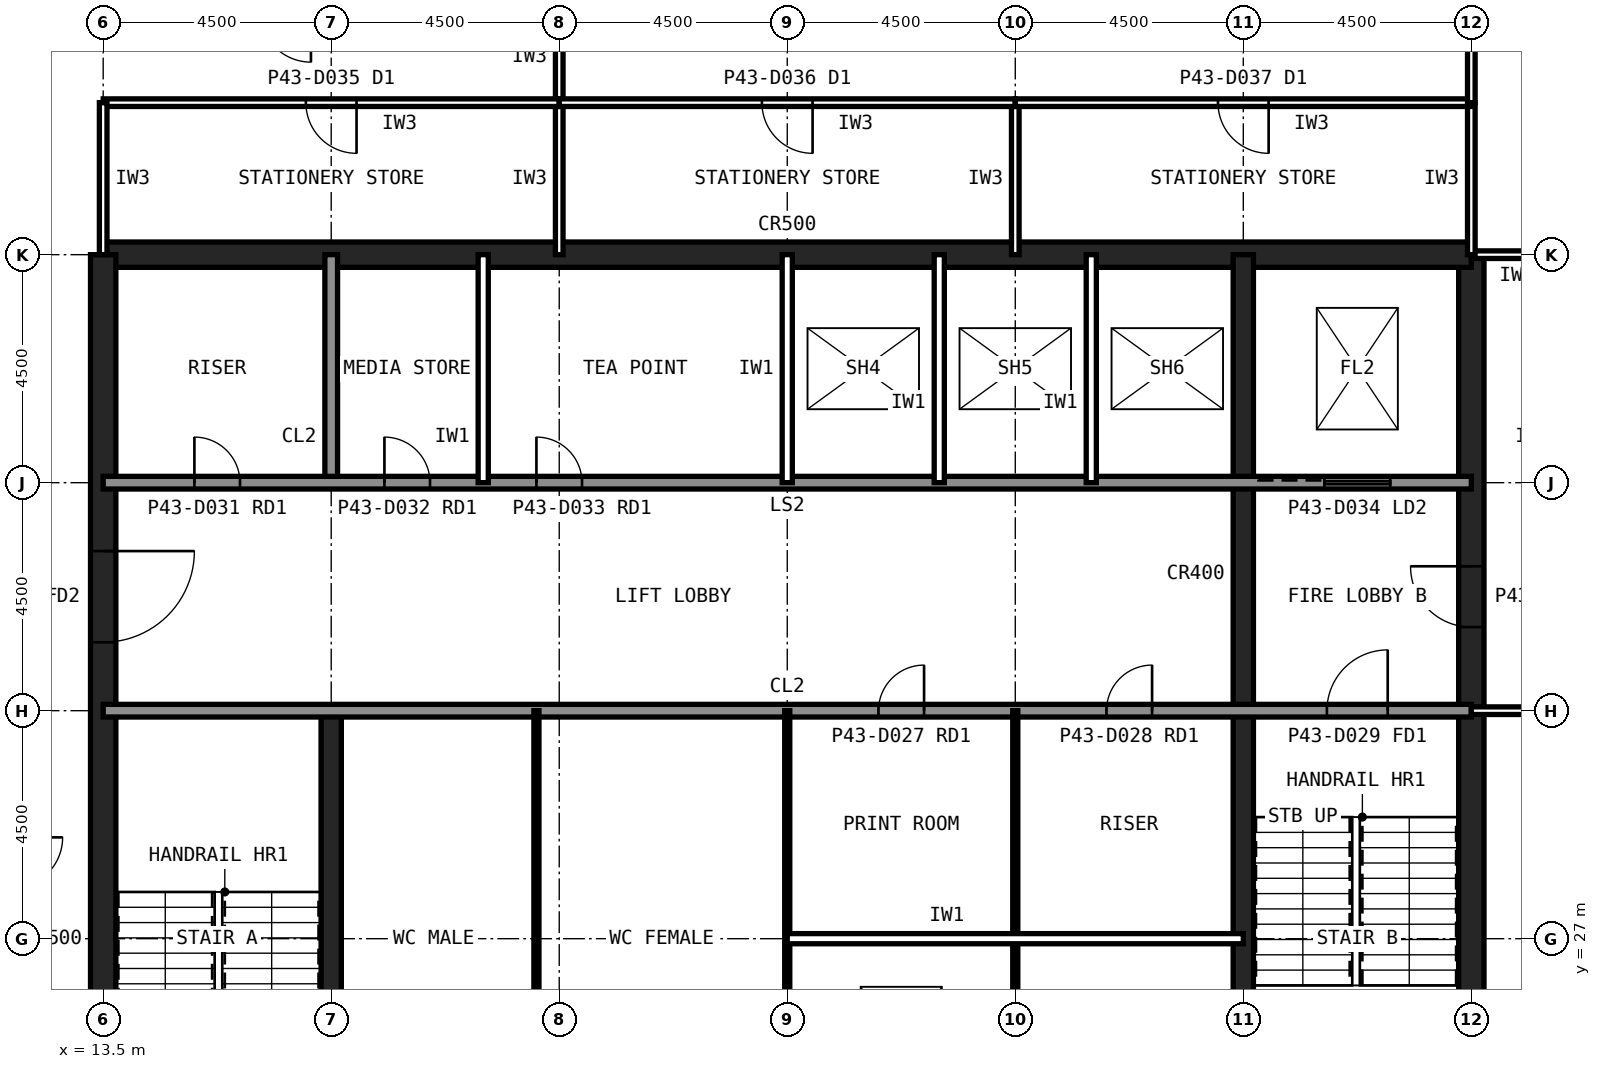
"""IFC4 building model, lengths in metres.
Left out: names, types, materials, properties, quantities, classifications, styles, units other than length and angle.
Written with IfcOpenShell. Run it as: python <this file> out.ifc"""

import sys

from ifc_helpers import new_model, si_unit, direction, frame, frame_2d, origin, place, context, subcontext, project, spatial, rectangle, extrude, element, fill, save


model = new_model("IFC4")
c1 = context("Model", 3, precision=1e-05, world=origin(), true_north=direction((0.0, 1.0)))
c2 = subcontext(c1, "Body", "Model", "MODEL_VIEW")
j1 = project(units=[si_unit("LENGTHUNIT", "METRE"), si_unit("PLANEANGLEUNIT", "RADIAN")], contexts=[c1])
p1 = place(None, origin())
s1 = spatial("IfcSite", under=j1, at=p1, CompositionType="ELEMENT")
p2 = place(p1, origin())
s2 = spatial("IfcBuilding", under=s1, at=p2, CompositionType="ELEMENT")
p3 = place(p2, frame((0.0, 0.0, 183.6)))
s3 = spatial("IfcBuildingStorey", under=s2, at=p3, CompositionType="ELEMENT", Elevation=183.6)
p4 = place(p3, frame((40.5, 13.5, 0.0), z_axis=(0.0, 0.0, 1.0), x_axis=(0.0, 1.0, 0.0)))
e1 = element("IfcWall", 1, at=p4, inside=s3, PredefinedType="SHEAR", context=c2, shape_type="SweptSolid", body=[
    extrude(rectangle(XDim=27.0, YDim=0.5, at=frame_2d((13.5, 0.0))), origin(), (0.0, 0.0, 1.0), 4.0),
])
p5 = place(p4, frame((5.85, 0.0, 0.0)))
e2 = element("IfcOpeningElement", 2, at=p5, cuts=e1, PredefinedType="OPENING", context=c2, shape_type="SweptSolid", body=[
    extrude(rectangle(XDim=1.8, YDim=2.1, at=frame_2d((0.9, 1.05))), frame((0.0, 0.26, 0.0), z_axis=(0.0, -1.0, 0.0), x_axis=(1.0, 0.0, 0.0)), (0.0, 0.0, 1.0), 0.52),
])
p6 = place(p4, frame((19.65, 0.0, 0.0)))
e3 = element("IfcOpeningElement", 3, at=p6, cuts=e1, PredefinedType="OPENING", context=c2, shape_type="SweptSolid", body=[
    extrude(rectangle(XDim=1.2, YDim=2.1, at=frame_2d((0.6, 1.05))), frame((0.0, 0.26, 0.0), z_axis=(0.0, -1.0, 0.0), x_axis=(1.0, 0.0, 0.0)), (0.0, 0.0, 1.0), 0.52),
])
p7 = place(p3, frame((40.5, 40.5, 0.0), z_axis=(0.0, 0.0, 1.0), x_axis=(-1.0, 0.0, 0.0)))
e4 = element("IfcWall", 4, at=p7, inside=s3, PredefinedType="SHEAR", context=c2, shape_type="SweptSolid", body=[
    extrude(rectangle(XDim=27.0, YDim=0.5, at=frame_2d((13.5, 0.0))), origin(), (0.0, 0.0, 1.0), 4.0),
])
p8 = place(p3, frame((13.5, 40.5, 0.0), z_axis=(0.0, 0.0, 1.0), x_axis=(0.0, -1.0, 0.0)))
e5 = element("IfcWall", 5, at=p8, inside=s3, PredefinedType="SHEAR", context=c2, shape_type="SweptSolid", body=[
    extrude(rectangle(XDim=27.0, YDim=0.5, at=frame_2d((13.5, 0.0))), origin(), (0.0, 0.0, 1.0), 4.0),
])
p9 = place(p8, frame((19.65, 0.0, 0.0)))
e6 = element("IfcOpeningElement", 6, at=p9, cuts=e5, PredefinedType="OPENING", context=c2, shape_type="SweptSolid", body=[
    extrude(rectangle(XDim=1.2, YDim=2.1, at=frame_2d((0.6, 1.05))), frame((0.0, 0.26, 0.0), z_axis=(0.0, -1.0, 0.0), x_axis=(1.0, 0.0, 0.0)), (0.0, 0.0, 1.0), 0.52),
])
p10 = place(p8, frame((5.85, 0.0, 0.0)))
e7 = element("IfcOpeningElement", 7, at=p10, cuts=e5, PredefinedType="OPENING", context=c2, shape_type="SweptSolid", body=[
    extrude(rectangle(XDim=1.8, YDim=2.1, at=frame_2d((0.9, 1.05))), frame((0.0, 0.26, 0.0), z_axis=(0.0, -1.0, 0.0), x_axis=(1.0, 0.0, 0.0)), (0.0, 0.0, 1.0), 0.52),
])
p11 = place(p3, frame((18.0, 13.5, 0.0), z_axis=(0.0, 0.0, 1.0), x_axis=(0.0, 1.0, 0.0)))
e8 = element("IfcWall", 8, at=p11, inside=s3, PredefinedType="SHEAR", context=c2, shape_type="SweptSolid", body=[
    extrude(rectangle(XDim=18.0, YDim=0.4, at=frame_2d((9.0, 0.0))), origin(), (0.0, 0.0, 1.0), 4.0),
])
p12 = place(p3, frame((18.0, 36.0, 0.0), z_axis=(0.0, 0.0, 1.0), x_axis=(0.0, 1.0, 0.0)))
e9 = element("IfcWall", 9, at=p12, inside=s3, PredefinedType="SOLIDWALL", context=c2, shape_type="SweptSolid", body=[
    extrude(rectangle(XDim=4.5, YDim=0.25, at=frame_2d((2.25, 0.0))), origin(), (0.0, 0.0, 1.0), 3.84),
])
p13 = place(p3, frame((36.0, 22.5, 0.0), z_axis=(0.0, 0.0, 1.0), x_axis=(0.0, 1.0, 0.0)))
e10 = element("IfcWall", 10, at=p13, inside=s3, PredefinedType="SHEAR", context=c2, shape_type="SweptSolid", body=[
    extrude(rectangle(XDim=18.0, YDim=0.4, at=frame_2d((9.0, 0.0))), origin(), (0.0, 0.0, 1.0), 4.0),
])
p14 = place(p3, frame((13.5, 36.0, 0.0), z_axis=(0.0, 0.0, 1.0), x_axis=(1.0, 0.0, 0.0)))
e11 = element("IfcWall", 11, at=p14, inside=s3, PredefinedType="SOLIDWALL", context=c2, shape_type="SweptSolid", body=[
    extrude(rectangle(XDim=27.0, YDim=0.25, at=frame_2d((13.5, 0.0))), origin(), (0.0, 0.0, 1.0), 3.84),
])
p15 = place(p14, frame((1.8, 0.0, 0.0)))
e12 = element("IfcOpeningElement", 12, at=p15, cuts=e11, PredefinedType="OPENING", context=c2, shape_type="SweptSolid", body=[
    extrude(rectangle(XDim=0.9, YDim=2.1, at=frame_2d((0.45, 1.05))), frame((0.0, 0.135, 0.0), z_axis=(0.0, -1.0, 0.0), x_axis=(1.0, 0.0, 0.0)), (0.0, 0.0, 1.0), 0.27),
])
p16 = place(p14, frame((5.55, 0.0, 0.0)))
e13 = element("IfcOpeningElement", 13, at=p16, cuts=e11, PredefinedType="OPENING", context=c2, shape_type="SweptSolid", body=[
    extrude(rectangle(XDim=0.9, YDim=2.1, at=frame_2d((0.45, 1.05))), frame((0.0, 0.135, 0.0), z_axis=(0.0, -1.0, 0.0), x_axis=(1.0, 0.0, 0.0)), (0.0, 0.0, 1.0), 0.27),
])
p17 = place(p14, frame((8.55, 0.0, 0.0)))
e14 = element("IfcOpeningElement", 14, at=p17, cuts=e11, PredefinedType="OPENING", context=c2, shape_type="SweptSolid", body=[
    extrude(rectangle(XDim=0.9, YDim=2.1, at=frame_2d((0.45, 1.05))), frame((0.0, 0.135, 0.0), z_axis=(0.0, -1.0, 0.0), x_axis=(1.0, 0.0, 0.0)), (0.0, 0.0, 1.0), 0.27),
])
p18 = place(p14, frame((24.1, 0.0, 0.0)))
e15 = element("IfcOpeningElement", 15, at=p18, cuts=e11, PredefinedType="OPENING", context=c2, shape_type="SweptSolid", body=[
    extrude(rectangle(XDim=1.3, YDim=2.2, at=frame_2d((0.65, 1.1))), frame((0.0, 0.135, 0.0), z_axis=(0.0, -1.0, 0.0), x_axis=(1.0, 0.0, 0.0)), (0.0, 0.0, 1.0), 0.27),
])
p19 = place(p3, frame((13.5, 31.5, 0.0), z_axis=(0.0, 0.0, 1.0), x_axis=(1.0, 0.0, 0.0)))
e16 = element("IfcWall", 16, at=p19, inside=s3, PredefinedType="SOLIDWALL", context=c2, shape_type="SweptSolid", body=[
    extrude(rectangle(XDim=27.0, YDim=0.25, at=frame_2d((13.5, 0.0))), origin(), (0.0, 0.0, 1.0), 3.84),
])
p20 = place(p19, frame((24.15, 0.0, 0.0)))
e17 = element("IfcOpeningElement", 17, at=p20, cuts=e16, PredefinedType="OPENING", context=c2, shape_type="SweptSolid", body=[
    extrude(rectangle(XDim=1.2, YDim=2.1, at=frame_2d((0.6, 1.05))), frame((0.0, 0.135, 0.0), z_axis=(0.0, -1.0, 0.0), x_axis=(1.0, 0.0, 0.0)), (0.0, 0.0, 1.0), 0.27),
])
p21 = place(p19, frame((15.3, 0.0, 0.0)))
e18 = element("IfcOpeningElement", 18, at=p21, cuts=e16, PredefinedType="OPENING", context=c2, shape_type="SweptSolid", body=[
    extrude(rectangle(XDim=0.9, YDim=2.1, at=frame_2d((0.45, 1.05))), frame((0.0, 0.135, 0.0), z_axis=(0.0, -1.0, 0.0), x_axis=(1.0, 0.0, 0.0)), (0.0, 0.0, 1.0), 0.27),
])
p22 = place(p19, frame((19.8, 0.0, 0.0)))
e19 = element("IfcOpeningElement", 19, at=p22, cuts=e16, PredefinedType="OPENING", context=c2, shape_type="SweptSolid", body=[
    extrude(rectangle(XDim=0.9, YDim=2.1, at=frame_2d((0.45, 1.05))), frame((0.0, 0.135, 0.0), z_axis=(0.0, -1.0, 0.0), x_axis=(1.0, 0.0, 0.0)), (0.0, 0.0, 1.0), 0.27),
])
for number, where, z_axis, x_axis in (
    (20, (21.0, 36.0, 0.0), (0.0, 0.0, 1.0), (0.0, 1.0, 0.0)),
    (21, (27.0, 36.0, 0.0), (0.0, 0.0, 1.0), (0.0, 1.0, 0.0)),
    (22, (30.0, 36.0, 0.0), (0.0, 0.0, 1.0), (0.0, 1.0, 0.0)),
    (23, (33.0, 36.0, 0.0), (0.0, 0.0, 1.0), (0.0, 1.0, 0.0)),
):
    element("IfcWall", number, at=place(p3, frame(where, z_axis=z_axis, x_axis=x_axis)), inside=s3, PredefinedType="PARTITIONING", context=c2, shape_type="SweptSolid", body=[
        extrude(rectangle(XDim=4.5, YDim=0.2, at=frame_2d((2.25, 0.0))), origin(), (0.0, 0.0, 1.0), 3.84),
    ])
for number, where, z_axis, x_axis in (
    (24, (22.05, 22.5, 0.0), (0.0, 0.0, 1.0), (0.0, 1.0, 0.0)),
    (25, (27.0, 22.5, 0.0), (0.0, 0.0, 1.0), (0.0, 1.0, 0.0)),
    (26, (31.5, 22.5, 0.0), (0.0, 0.0, 1.0), (0.0, 1.0, 0.0)),
):
    element("IfcWall", number, at=place(p3, frame(where, z_axis=z_axis, x_axis=x_axis)), inside=s3, PredefinedType="PLUMBINGWALL", context=c2, shape_type="SweptSolid", body=[
        extrude(rectangle(XDim=9.0, YDim=0.1, at=frame_2d((4.5, 0.0))), origin(), (0.0, 0.0, 1.0), 3.84),
    ])
p23 = place(p3, frame((27.0, 27.0, 0.0), z_axis=(0.0, 0.0, 1.0), x_axis=(1.0, 0.0, 0.0)))
e27 = element("IfcWall", 27, at=p23, inside=s3, PredefinedType="PARTITIONING", context=c2, shape_type="SweptSolid", body=[
    extrude(rectangle(XDim=9.0, YDim=0.2, at=frame_2d((4.5, 0.0))), origin(), (0.0, 0.0, 1.0), 3.84),
])
for number, where, z_axis, x_axis in (
    (28, (22.5, 43.5, 0.0), (0.0, 0.0, 1.0), (0.0, 1.0, 0.0)),
    (29, (42.3, 40.5, 0.0), (0.0, 0.0, 1.0), (-1.0, 0.0, 0.0)),
):
    element("IfcWall", number, at=place(p3, frame(where, z_axis=z_axis, x_axis=x_axis)), inside=s3, PredefinedType="PARTITIONING", context=c2, shape_type="SweptSolid", body=[
        extrude(rectangle(XDim=1.8, YDim=0.15, at=frame_2d((0.9, 0.0))), origin(), (0.0, 0.0, 1.0), 2.989),
    ])
p24 = place(p3, frame((47.25, 31.5, 0.0), z_axis=(0.0, 0.0, 1.0), x_axis=(-1.0, 0.0, 0.0)))
e30 = element("IfcWall", 30, at=p24, inside=s3, PredefinedType="PARTITIONING", context=c2, shape_type="SweptSolid", body=[
    extrude(rectangle(XDim=6.75, YDim=0.15, at=frame_2d((3.375, 0.0))), origin(), (0.0, 0.0, 1.0), 2.989),
])
p25 = place(p24, frame((2.875, 0.0, 0.0)))
e31 = element("IfcOpeningElement", 31, at=p25, cuts=e30, PredefinedType="OPENING", context=c2, shape_type="SweptSolid", body=[
    extrude(rectangle(XDim=1.0, YDim=2.1, at=frame_2d((0.5, 1.05))), frame((0.0, 0.085, 0.0), z_axis=(0.0, -1.0, 0.0), x_axis=(1.0, 0.0, 0.0)), (0.0, 0.0, 1.0), 0.17),
])
p26 = place(p3, frame((22.5, 40.5, 0.0), z_axis=(0.0, 0.0, 1.0), x_axis=(0.0, 1.0, 0.0)))
e32 = element("IfcWall", 32, at=p26, inside=s3, PredefinedType="PARTITIONING", context=c2, shape_type="SweptSolid", body=[
    extrude(rectangle(XDim=3.0, YDim=0.15, at=frame_2d((1.5, 0.0))), origin(), (0.0, 0.0, 1.0), 2.989),
])
p27 = place(p3, frame((22.5, 43.5, 0.0), z_axis=(0.0, 0.0, 1.0), x_axis=(-1.0, 0.0, 0.0)))
e33 = element("IfcWall", 33, at=p27, inside=s3, PredefinedType="PARTITIONING", context=c2, shape_type="SweptSolid", body=[
    extrude(rectangle(XDim=9.0, YDim=0.15, at=frame_2d((4.5, 0.0))), origin(), (0.0, 0.0, 1.0), 3.84),
])
p28 = place(p27, frame((4.0, 0.0, 0.0)))
e34 = element("IfcOpeningElement", 34, at=p28, cuts=e33, PredefinedType="OPENING", context=c2, shape_type="SweptSolid", body=[
    extrude(rectangle(XDim=1.0, YDim=2.1, at=frame_2d((0.5, 1.05))), frame((0.0, 0.085, 0.0), z_axis=(0.0, -1.0, 0.0), x_axis=(1.0, 0.0, 0.0)), (0.0, 0.0, 1.0), 0.17),
])
for number, where, z_axis, x_axis in (
    (35, (13.5, 43.5, 0.0), (0.0, 0.0, 1.0), (0.0, -1.0, 0.0)),
    (36, (31.5, 40.5, 0.0), (0.0, 0.0, 1.0), (0.0, 1.0, 0.0)),
):
    element("IfcWall", number, at=place(p3, frame(where, z_axis=z_axis, x_axis=x_axis)), inside=s3, PredefinedType="PARTITIONING", context=c2, shape_type="SweptSolid", body=[
        extrude(rectangle(XDim=3.0, YDim=0.15, at=frame_2d((1.5, 0.0))), origin(), (0.0, 0.0, 1.0), 2.989),
    ])
p29 = place(p3, frame((31.5, 43.5, 0.0), z_axis=(0.0, 0.0, 1.0), x_axis=(-1.0, 0.0, 0.0)))
e37 = element("IfcWall", 37, at=p29, inside=s3, PredefinedType="PARTITIONING", context=c2, shape_type="SweptSolid", body=[
    extrude(rectangle(XDim=9.0, YDim=0.15, at=frame_2d((4.5, 0.0))), origin(), (0.0, 0.0, 1.0), 3.84),
])
p30 = place(p29, frame((4.0, 0.0, 0.0)))
e38 = element("IfcOpeningElement", 38, at=p30, cuts=e37, PredefinedType="OPENING", context=c2, shape_type="SweptSolid", body=[
    extrude(rectangle(XDim=1.0, YDim=2.1, at=frame_2d((0.5, 1.05))), frame((0.0, 0.085, 0.0), z_axis=(0.0, -1.0, 0.0), x_axis=(1.0, 0.0, 0.0)), (0.0, 0.0, 1.0), 0.17),
])
p31 = place(p3, frame((40.5, 40.5, 0.0), z_axis=(0.0, 0.0, 1.0), x_axis=(0.0, 1.0, 0.0)))
e39 = element("IfcWall", 39, at=p31, inside=s3, PredefinedType="PARTITIONING", context=c2, shape_type="SweptSolid", body=[
    extrude(rectangle(XDim=3.0, YDim=0.15, at=frame_2d((1.5, 0.0))), origin(), (0.0, 0.0, 1.0), 2.989),
])
p32 = place(p3, frame((40.5, 43.5, 0.0), z_axis=(0.0, 0.0, 1.0), x_axis=(-1.0, 0.0, 0.0)))
e40 = element("IfcWall", 40, at=p32, inside=s3, PredefinedType="PARTITIONING", context=c2, shape_type="SweptSolid", body=[
    extrude(rectangle(XDim=9.0, YDim=0.15, at=frame_2d((4.5, 0.0))), origin(), (0.0, 0.0, 1.0), 3.84),
])
p33 = place(p32, frame((4.0, 0.0, 0.0)))
e41 = element("IfcOpeningElement", 41, at=p33, cuts=e40, PredefinedType="OPENING", context=c2, shape_type="SweptSolid", body=[
    extrude(rectangle(XDim=1.0, YDim=2.1, at=frame_2d((0.5, 1.05))), frame((0.0, 0.085, 0.0), z_axis=(0.0, -1.0, 0.0), x_axis=(1.0, 0.0, 0.0)), (0.0, 0.0, 1.0), 0.17),
])
p34 = place(p3, frame((40.5, 49.13, 0.0), z_axis=(0.0, 0.0, 1.0), x_axis=(0.0, -1.0, 0.0)))
e42 = element("IfcWall", 42, at=p34, inside=s3, PredefinedType="PARTITIONING", context=c2, shape_type="SweptSolid", body=[
    extrude(rectangle(XDim=5.63, YDim=0.15, at=frame_2d((2.815, 0.0))), origin(), (0.0, 0.0, 1.0), 2.989),
])
p35 = place(p34, frame((2.315, 0.0, 0.0)))
e43 = element("IfcOpeningElement", 43, at=p35, cuts=e42, PredefinedType="OPENING", context=c2, shape_type="SweptSolid", body=[
    extrude(rectangle(XDim=1.0, YDim=2.1, at=frame_2d((0.5, 1.05))), frame((0.0, 0.085, 0.0), z_axis=(0.0, -1.0, 0.0), x_axis=(1.0, 0.0, 0.0)), (0.0, 0.0, 1.0), 0.17),
])
p36 = place(p10, origin())
e44 = element("IfcDoor", 44, at=p36, inside=s3, OperationType="SINGLE_SWING_LEFT", PredefinedType="DOOR", context=c2, shape_type="SweptSolid", body=[
    extrude(rectangle(XDim=1.8, YDim=2.1, at=frame_2d((0.9, 1.05))), frame((0.0, 0.025, 0.0), z_axis=(0.0, -1.0, 0.0), x_axis=(1.0, 0.0, 0.0)), (0.0, 0.0, 1.0), 0.05),
])
fill(e7, e44)
p37 = place(p6, origin())
e45 = element("IfcDoor", 45, at=p37, inside=s3, OperationType="SINGLE_SWING_RIGHT", PredefinedType="DOOR", context=c2, shape_type="SweptSolid", body=[
    extrude(rectangle(XDim=1.2, YDim=2.1, at=frame_2d((0.6, 1.05))), frame((0.0, 0.025, 0.0), z_axis=(0.0, -1.0, 0.0), x_axis=(1.0, 0.0, 0.0)), (0.0, 0.0, 1.0), 0.05),
])
fill(e3, e45)
p38 = place(p20, origin())
e46 = element("IfcDoor", 46, at=p38, inside=s3, OperationType="SINGLE_SWING_RIGHT", PredefinedType="DOOR", context=c2, shape_type="SweptSolid", body=[
    extrude(rectangle(XDim=1.2, YDim=2.1, at=frame_2d((0.6, 1.05))), frame((0.0, 0.025, 0.0), z_axis=(0.0, -1.0, 0.0), x_axis=(1.0, 0.0, 0.0)), (0.0, 0.0, 1.0), 0.05),
])
fill(e17, e46)
p39 = place(p21, origin())
e47 = element("IfcDoor", 47, at=p39, inside=s3, OperationType="SINGLE_SWING_RIGHT", PredefinedType="DOOR", context=c2, shape_type="SweptSolid", body=[
    extrude(rectangle(XDim=0.9, YDim=2.1, at=frame_2d((0.45, 1.05))), frame((0.0, 0.025, 0.0), z_axis=(0.0, -1.0, 0.0), x_axis=(1.0, 0.0, 0.0)), (0.0, 0.0, 1.0), 0.05),
])
fill(e18, e47)
p40 = place(p22, origin())
e48 = element("IfcDoor", 48, at=p40, inside=s3, OperationType="SINGLE_SWING_RIGHT", PredefinedType="DOOR", context=c2, shape_type="SweptSolid", body=[
    extrude(rectangle(XDim=0.9, YDim=2.1, at=frame_2d((0.45, 1.05))), frame((0.0, 0.025, 0.0), z_axis=(0.0, -1.0, 0.0), x_axis=(1.0, 0.0, 0.0)), (0.0, 0.0, 1.0), 0.05),
])
fill(e19, e48)
p41 = place(p15, origin())
e49 = element("IfcDoor", 49, at=p41, inside=s3, OperationType="SINGLE_SWING_LEFT", PredefinedType="DOOR", context=c2, shape_type="SweptSolid", body=[
    extrude(rectangle(XDim=0.9, YDim=2.1, at=frame_2d((0.45, 1.05))), frame((0.0, 0.025, 0.0), z_axis=(0.0, -1.0, 0.0), x_axis=(1.0, 0.0, 0.0)), (0.0, 0.0, 1.0), 0.05),
])
fill(e12, e49)
p42 = place(p16, origin())
e50 = element("IfcDoor", 50, at=p42, inside=s3, OperationType="SINGLE_SWING_LEFT", PredefinedType="DOOR", context=c2, shape_type="SweptSolid", body=[
    extrude(rectangle(XDim=0.9, YDim=2.1, at=frame_2d((0.45, 1.05))), frame((0.0, 0.025, 0.0), z_axis=(0.0, -1.0, 0.0), x_axis=(1.0, 0.0, 0.0)), (0.0, 0.0, 1.0), 0.05),
])
fill(e13, e50)
p43 = place(p17, origin())
e51 = element("IfcDoor", 51, at=p43, inside=s3, OperationType="SINGLE_SWING_LEFT", PredefinedType="DOOR", context=c2, shape_type="SweptSolid", body=[
    extrude(rectangle(XDim=0.9, YDim=2.1, at=frame_2d((0.45, 1.05))), frame((0.0, 0.025, 0.0), z_axis=(0.0, -1.0, 0.0), x_axis=(1.0, 0.0, 0.0)), (0.0, 0.0, 1.0), 0.05),
])
fill(e14, e51)
p44 = place(p18, origin())
e52 = element("IfcDoor", 52, at=p44, inside=s3, OperationType="SLIDING_TO_LEFT", PredefinedType="DOOR", context=c2, shape_type="SweptSolid", body=[
    extrude(rectangle(XDim=1.3, YDim=2.2, at=frame_2d((0.65, 1.1))), frame((0.0, 0.025, 0.0), z_axis=(0.0, -1.0, 0.0), x_axis=(1.0, 0.0, 0.0)), (0.0, 0.0, 1.0), 0.05),
])
fill(e15, e52)
p45 = place(p28, origin())
e53 = element("IfcDoor", 53, at=p45, inside=s3, OperationType="SINGLE_SWING_LEFT", PredefinedType="DOOR", context=c2, shape_type="SweptSolid", body=[
    extrude(rectangle(XDim=1.0, YDim=2.1, at=frame_2d((0.5, 1.05))), frame((0.0, 0.025, 0.0), z_axis=(0.0, -1.0, 0.0), x_axis=(1.0, 0.0, 0.0)), (0.0, 0.0, 1.0), 0.05),
])
fill(e34, e53)
p46 = place(p30, origin())
e54 = element("IfcDoor", 54, at=p46, inside=s3, OperationType="SINGLE_SWING_LEFT", PredefinedType="DOOR", context=c2, shape_type="SweptSolid", body=[
    extrude(rectangle(XDim=1.0, YDim=2.1, at=frame_2d((0.5, 1.05))), frame((0.0, 0.025, 0.0), z_axis=(0.0, -1.0, 0.0), x_axis=(1.0, 0.0, 0.0)), (0.0, 0.0, 1.0), 0.05),
])
fill(e38, e54)
p47 = place(p33, origin())
e55 = element("IfcDoor", 55, at=p47, inside=s3, OperationType="SINGLE_SWING_LEFT", PredefinedType="DOOR", context=c2, shape_type="SweptSolid", body=[
    extrude(rectangle(XDim=1.0, YDim=2.1, at=frame_2d((0.5, 1.05))), frame((0.0, 0.025, 0.0), z_axis=(0.0, -1.0, 0.0), x_axis=(1.0, 0.0, 0.0)), (0.0, 0.0, 1.0), 0.05),
])
fill(e41, e55)
save(model, sys.argv[1])
